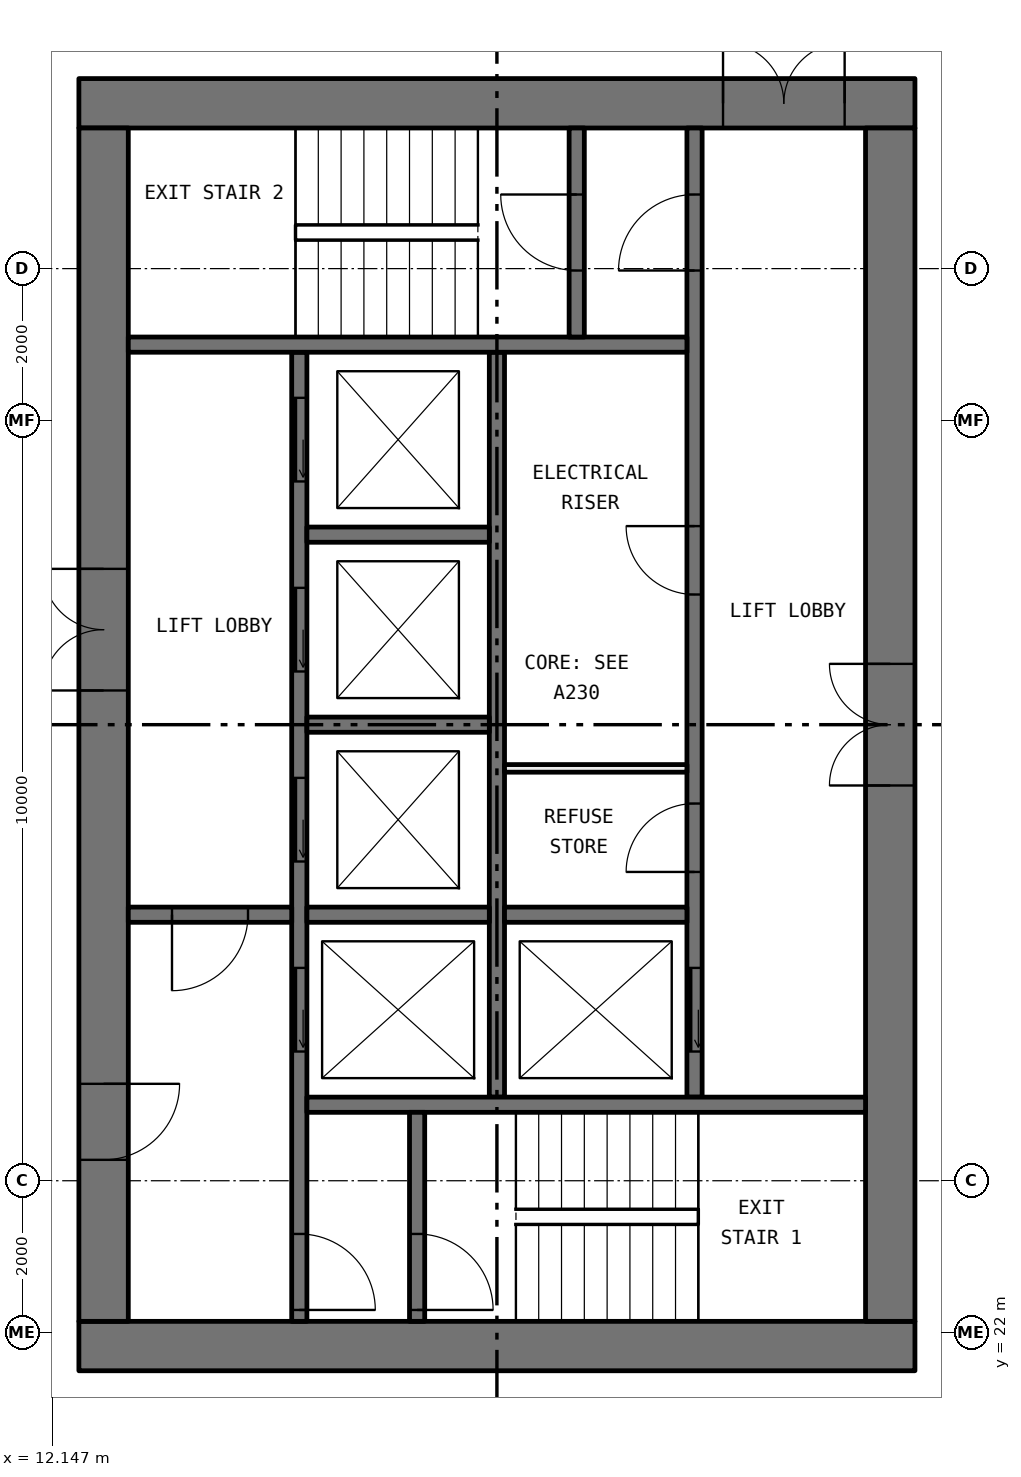
"""IFC4 building model, lengths in metres.
Left out: names, types, materials, properties, quantities, classifications, styles, units other than length and angle.
Written with IfcOpenShell. Run it as: python <this file> out.ifc"""

import sys

from ifc_helpers import new_model, si_unit, direction, frame, frame_2d, origin, place, context, subcontext, project, spatial, rectangle, extrude, element, fill, save


model = new_model("IFC4")
c1 = context("Model", 3, precision=1e-05, world=origin(), true_north=direction((0.0, 1.0)))
c2 = subcontext(c1, "Body", "Model", "MODEL_VIEW")
j1 = project(units=[si_unit("LENGTHUNIT", "METRE"), si_unit("PLANEANGLEUNIT", "RADIAN")], contexts=[c1])
p1 = place(None, origin())
s1 = spatial("IfcSite", under=j1, at=p1, CompositionType="ELEMENT")
p2 = place(p1, origin())
s2 = spatial("IfcBuilding", under=s1, at=p2, CompositionType="ELEMENT")
p3 = place(p2, frame((0.0, 0.0, 113.85)))
s3 = spatial("IfcBuildingStorey", under=s2, at=p3, CompositionType="ELEMENT", Elevation=113.85)
p4 = place(p3, frame((12.5, 21.825, 0.0), z_axis=(0.0, 0.0, 1.0), x_axis=(1.0, 0.0, 0.0)))
e1 = element("IfcWall", 1, at=p4, inside=s3, PredefinedType="SHEAR", context=c2, shape_type="SweptSolid", body=[
    extrude(rectangle(XDim=11.0, YDim=0.65, at=frame_2d((5.5, 0.0))), origin(), (0.0, 0.0, 1.0), 3.05),
])
p5 = place(p3, frame((12.5, 38.175, 0.0), z_axis=(0.0, 0.0, 1.0), x_axis=(1.0, 0.0, 0.0)))
e2 = element("IfcWall", 2, at=p5, inside=s3, PredefinedType="SHEAR", context=c2, shape_type="SweptSolid", body=[
    extrude(rectangle(XDim=11.0, YDim=0.65, at=frame_2d((5.5, 0.0))), origin(), (0.0, 0.0, 1.0), 3.05),
])
p6 = place(p5, frame((8.475, 0.0, 0.0)))
e3 = element("IfcOpeningElement", 3, at=p6, cuts=e2, PredefinedType="OPENING", context=c2, shape_type="SweptSolid", body=[
    extrude(rectangle(XDim=1.6, YDim=2.1, at=frame_2d((0.8, 1.05))), frame((0.0, 0.335, 0.0), z_axis=(0.0, -1.0, 0.0), x_axis=(1.0, 0.0, 0.0)), (0.0, 0.0, 1.0), 0.67),
])
p7 = place(p3, frame((12.825, 22.15, 0.0), z_axis=(0.0, 0.0, 1.0), x_axis=(0.0, 1.0, 0.0)))
e4 = element("IfcWall", 4, at=p7, inside=s3, PredefinedType="SHEAR", context=c2, shape_type="SweptSolid", body=[
    extrude(rectangle(XDim=15.7, YDim=0.65, at=frame_2d((7.85, 0.0))), origin(), (0.0, 0.0, 1.0), 3.05),
])
p8 = place(p7, frame((8.3, 0.0, 0.0)))
e5 = element("IfcOpeningElement", 5, at=p8, cuts=e4, PredefinedType="OPENING", context=c2, shape_type="SweptSolid", body=[
    extrude(rectangle(XDim=1.6, YDim=2.1, at=frame_2d((0.8, 1.05))), frame((0.0, 0.335, 0.0), z_axis=(0.0, -1.0, 0.0), x_axis=(1.0, 0.0, 0.0)), (0.0, 0.0, 1.0), 0.67),
])
p9 = place(p7, frame((2.125, 0.0, 0.0)))
e6 = element("IfcOpeningElement", 6, at=p9, cuts=e4, PredefinedType="OPENING", context=c2, shape_type="SweptSolid", body=[
    extrude(rectangle(XDim=1.0, YDim=2.1, at=frame_2d((0.5, 1.05))), frame((0.0, 0.335, 0.0), z_axis=(0.0, -1.0, 0.0), x_axis=(1.0, 0.0, 0.0)), (0.0, 0.0, 1.0), 0.67),
])
p10 = place(p3, frame((23.175, 22.15, 0.0), z_axis=(0.0, 0.0, 1.0), x_axis=(0.0, 1.0, 0.0)))
e7 = element("IfcWall", 7, at=p10, inside=s3, PredefinedType="SHEAR", context=c2, shape_type="SweptSolid", body=[
    extrude(rectangle(XDim=15.7, YDim=0.65, at=frame_2d((7.85, 0.0))), origin(), (0.0, 0.0, 1.0), 3.05),
])
p11 = place(p10, frame((7.05, 0.0, 0.0)))
e8 = element("IfcOpeningElement", 8, at=p11, cuts=e7, PredefinedType="OPENING", context=c2, shape_type="SweptSolid", body=[
    extrude(rectangle(XDim=1.6, YDim=2.1, at=frame_2d((0.8, 1.05))), frame((0.0, 0.335, 0.0), z_axis=(0.0, -1.0, 0.0), x_axis=(1.0, 0.0, 0.0)), (0.0, 0.0, 1.0), 0.67),
])
p12 = place(p3, frame((15.4, 22.15, 0.0), z_axis=(0.0, 0.0, 1.0), x_axis=(0.0, 1.0, 0.0)))
e9 = element("IfcWall", 9, at=p12, inside=s3, PredefinedType="SOLIDWALL", context=c2, shape_type="SweptSolid", body=[
    extrude(rectangle(XDim=12.75, YDim=0.2, at=frame_2d((6.375, 0.0))), origin(), (0.0, 0.0, 1.0), 3.05),
])
p13 = place(p12, frame((3.55, 0.0, 0.0)))
e10 = element("IfcOpeningElement", 10, at=p13, cuts=e9, PredefinedType="OPENING", context=c2, shape_type="SweptSolid", body=[
    extrude(rectangle(XDim=1.1, YDim=2.1, at=frame_2d((0.55, 1.05))), frame((0.0, 0.11, 0.0), z_axis=(0.0, -1.0, 0.0), x_axis=(1.0, 0.0, 0.0)), (0.0, 0.0, 1.0), 0.22),
])
p14 = place(p12, frame((6.05, 0.0, 0.0)))
e11 = element("IfcOpeningElement", 11, at=p14, cuts=e9, PredefinedType="OPENING", context=c2, shape_type="SweptSolid", body=[
    extrude(rectangle(XDim=1.1, YDim=2.1, at=frame_2d((0.55, 1.05))), frame((0.0, 0.11, 0.0), z_axis=(0.0, -1.0, 0.0), x_axis=(1.0, 0.0, 0.0)), (0.0, 0.0, 1.0), 0.22),
])
p15 = place(p12, frame((8.55, 0.0, 0.0)))
e12 = element("IfcOpeningElement", 12, at=p15, cuts=e9, PredefinedType="OPENING", context=c2, shape_type="SweptSolid", body=[
    extrude(rectangle(XDim=1.1, YDim=2.1, at=frame_2d((0.55, 1.05))), frame((0.0, 0.11, 0.0), z_axis=(0.0, -1.0, 0.0), x_axis=(1.0, 0.0, 0.0)), (0.0, 0.0, 1.0), 0.22),
])
p16 = place(p12, frame((11.05, 0.0, 0.0)))
e13 = element("IfcOpeningElement", 13, at=p16, cuts=e9, PredefinedType="OPENING", context=c2, shape_type="SweptSolid", body=[
    extrude(rectangle(XDim=1.1, YDim=2.1, at=frame_2d((0.55, 1.05))), frame((0.0, 0.11, 0.0), z_axis=(0.0, -1.0, 0.0), x_axis=(1.0, 0.0, 0.0)), (0.0, 0.0, 1.0), 0.22),
])
p17 = place(p12, frame((0.15, 0.0, 0.0)))
e14 = element("IfcOpeningElement", 14, at=p17, cuts=e9, PredefinedType="OPENING", context=c2, shape_type="SweptSolid", body=[
    extrude(rectangle(XDim=1.0, YDim=2.1, at=frame_2d((0.5, 1.05))), frame((0.0, 0.11, 0.0), z_axis=(0.0, -1.0, 0.0), x_axis=(1.0, 0.0, 0.0)), (0.0, 0.0, 1.0), 0.22),
])
p18 = place(p3, frame((20.6, 25.1, 0.0), z_axis=(0.0, 0.0, 1.0), x_axis=(0.0, 1.0, 0.0)))
e15 = element("IfcWall", 15, at=p18, inside=s3, PredefinedType="SOLIDWALL", context=c2, shape_type="SweptSolid", body=[
    extrude(rectangle(XDim=12.75, YDim=0.2, at=frame_2d((6.375, 0.0))), origin(), (0.0, 0.0, 1.0), 3.05),
])
p19 = place(p18, frame((0.6, 0.0, 0.0)))
e16 = element("IfcOpeningElement", 16, at=p19, cuts=e15, PredefinedType="OPENING", context=c2, shape_type="SweptSolid", body=[
    extrude(rectangle(XDim=1.1, YDim=2.1, at=frame_2d((0.55, 1.05))), frame((0.0, 0.11, 0.0), z_axis=(0.0, -1.0, 0.0), x_axis=(1.0, 0.0, 0.0)), (0.0, 0.0, 1.0), 0.22),
])
p20 = place(p18, frame((10.875, 0.0, 0.0)))
e17 = element("IfcOpeningElement", 17, at=p20, cuts=e15, PredefinedType="OPENING", context=c2, shape_type="SweptSolid", body=[
    extrude(rectangle(XDim=1.0, YDim=2.1, at=frame_2d((0.5, 1.05))), frame((0.0, 0.11, 0.0), z_axis=(0.0, -1.0, 0.0), x_axis=(1.0, 0.0, 0.0)), (0.0, 0.0, 1.0), 0.22),
])
p21 = place(p18, frame((2.962, 0.0, 0.0)))
e18 = element("IfcOpeningElement", 18, at=p21, cuts=e15, PredefinedType="OPENING", context=c2, shape_type="SweptSolid", body=[
    extrude(rectangle(XDim=0.9, YDim=2.1, at=frame_2d((0.45, 1.05))), frame((0.0, 0.11, 0.0), z_axis=(0.0, -1.0, 0.0), x_axis=(1.0, 0.0, 0.0)), (0.0, 0.0, 1.0), 0.22),
])
p22 = place(p18, frame((6.613, 0.0, 0.0)))
e19 = element("IfcOpeningElement", 19, at=p22, cuts=e15, PredefinedType="OPENING", context=c2, shape_type="SweptSolid", body=[
    extrude(rectangle(XDim=0.9, YDim=2.1, at=frame_2d((0.45, 1.05))), frame((0.0, 0.11, 0.0), z_axis=(0.0, -1.0, 0.0), x_axis=(1.0, 0.0, 0.0)), (0.0, 0.0, 1.0), 0.22),
])
p23 = place(p3, frame((18.0, 25.1, 0.0), z_axis=(0.0, 0.0, 1.0), x_axis=(0.0, 1.0, 0.0)))
e20 = element("IfcWall", 20, at=p23, inside=s3, PredefinedType="SOLIDWALL", context=c2, shape_type="SweptSolid", body=[
    extrude(rectangle(XDim=9.8, YDim=0.2, at=frame_2d((4.9, 0.0))), origin(), (0.0, 0.0, 1.0), 3.05),
])
for number, where, z_axis, x_axis in (
    (21, (15.5, 25.0, 0.0), (0.0, 0.0, 1.0), (1.0, 0.0, 0.0)),
    (22, (13.15, 35.0, 0.0), (0.0, 0.0, 1.0), (1.0, 0.0, 0.0)),
):
    element("IfcWall", number, at=place(p3, frame(where, z_axis=z_axis, x_axis=x_axis)), inside=s3, PredefinedType="SOLIDWALL", context=c2, shape_type="SweptSolid", body=[
        extrude(rectangle(XDim=7.35, YDim=0.2, at=frame_2d((3.675, 0.0))), origin(), (0.0, 0.0, 1.0), 3.05),
    ])
p24 = place(p3, frame((13.15, 27.5, 0.0), z_axis=(0.0, 0.0, 1.0), x_axis=(1.0, 0.0, 0.0)))
e23 = element("IfcWall", 23, at=p24, inside=s3, PredefinedType="SOLIDWALL", context=c2, shape_type="SweptSolid", body=[
    extrude(rectangle(XDim=2.15, YDim=0.2, at=frame_2d((1.075, 0.0))), origin(), (0.0, 0.0, 1.0), 3.05),
])
p25 = place(p24, frame((0.575, 0.0, 0.0)))
e24 = element("IfcOpeningElement", 24, at=p25, cuts=e23, PredefinedType="OPENING", context=c2, shape_type="SweptSolid", body=[
    extrude(rectangle(XDim=1.0, YDim=2.1, at=frame_2d((0.5, 1.05))), frame((0.0, 0.11, 0.0), z_axis=(0.0, -1.0, 0.0), x_axis=(1.0, 0.0, 0.0)), (0.0, 0.0, 1.0), 0.22),
])
p26 = place(p3, frame((16.95, 22.15, 0.0), z_axis=(0.0, 0.0, 1.0), x_axis=(0.0, 1.0, 0.0)))
e25 = element("IfcWall", 25, at=p26, inside=s3, PredefinedType="SOLIDWALL", context=c2, shape_type="SweptSolid", body=[
    extrude(rectangle(XDim=2.75, YDim=0.2, at=frame_2d((1.375, 0.0))), origin(), (0.0, 0.0, 1.0), 3.05),
])
p27 = place(p26, frame((0.15, 0.0, 0.0)))
e26 = element("IfcOpeningElement", 26, at=p27, cuts=e25, PredefinedType="OPENING", context=c2, shape_type="SweptSolid", body=[
    extrude(rectangle(XDim=1.0, YDim=2.1, at=frame_2d((0.5, 1.05))), frame((0.0, 0.11, 0.0), z_axis=(0.0, -1.0, 0.0), x_axis=(1.0, 0.0, 0.0)), (0.0, 0.0, 1.0), 0.22),
])
p28 = place(p3, frame((19.05, 35.1, 0.0), z_axis=(0.0, 0.0, 1.0), x_axis=(0.0, 1.0, 0.0)))
e27 = element("IfcWall", 27, at=p28, inside=s3, PredefinedType="SOLIDWALL", context=c2, shape_type="SweptSolid", body=[
    extrude(rectangle(XDim=2.75, YDim=0.2, at=frame_2d((1.375, 0.0))), origin(), (0.0, 0.0, 1.0), 3.05),
])
p29 = place(p28, frame((0.875, 0.0, 0.0)))
e28 = element("IfcOpeningElement", 28, at=p29, cuts=e27, PredefinedType="OPENING", context=c2, shape_type="SweptSolid", body=[
    extrude(rectangle(XDim=1.0, YDim=2.1, at=frame_2d((0.5, 1.05))), frame((0.0, 0.11, 0.0), z_axis=(0.0, -1.0, 0.0), x_axis=(1.0, 0.0, 0.0)), (0.0, 0.0, 1.0), 0.22),
])
for number, where, z_axis, x_axis in (
    (29, (15.5, 27.5, 0.0), (0.0, 0.0, 1.0), (1.0, 0.0, 0.0)),
    (30, (15.5, 30.0, 0.0), (0.0, 0.0, 1.0), (1.0, 0.0, 0.0)),
    (31, (15.5, 32.5, 0.0), (0.0, 0.0, 1.0), (1.0, 0.0, 0.0)),
    (32, (18.1, 27.5, 0.0), (0.0, 0.0, 1.0), (1.0, 0.0, 0.0)),
):
    element("IfcWall", number, at=place(p3, frame(where, z_axis=z_axis, x_axis=x_axis)), inside=s3, PredefinedType="SOLIDWALL", context=c2, shape_type="SweptSolid", body=[
        extrude(rectangle(XDim=2.4, YDim=0.2, at=frame_2d((1.2, 0.0))), origin(), (0.0, 0.0, 1.0), 3.05),
    ])
p30 = place(p3, frame((18.1, 29.425, 0.0), z_axis=(0.0, 0.0, 1.0), x_axis=(1.0, 0.0, 0.0)))
e33 = element("IfcWall", 33, at=p30, inside=s3, PredefinedType="PARTITIONING", context=c2, shape_type="SweptSolid", body=[
    extrude(rectangle(XDim=2.4, YDim=0.1, at=frame_2d((1.2, 0.0))), origin(), (0.0, 0.0, 1.0), 3.05),
])
p31 = place(p19, origin())
e34 = element("IfcDoor", 34, at=p31, inside=s3, OperationType="SLIDING_TO_LEFT", PredefinedType="DOOR", context=c2, shape_type="SweptSolid", body=[
    extrude(rectangle(XDim=1.1, YDim=2.1, at=frame_2d((0.55, 1.05))), frame((0.0, 0.025, 0.0), z_axis=(0.0, -1.0, 0.0), x_axis=(1.0, 0.0, 0.0)), (0.0, 0.0, 1.0), 0.05),
])
fill(e16, e34)
p32 = place(p13, origin())
e35 = element("IfcDoor", 35, at=p32, inside=s3, OperationType="SLIDING_TO_LEFT", PredefinedType="DOOR", context=c2, shape_type="SweptSolid", body=[
    extrude(rectangle(XDim=1.1, YDim=2.1, at=frame_2d((0.55, 1.05))), frame((0.0, 0.025, 0.0), z_axis=(0.0, -1.0, 0.0), x_axis=(1.0, 0.0, 0.0)), (0.0, 0.0, 1.0), 0.05),
])
fill(e10, e35)
p33 = place(p14, origin())
e36 = element("IfcDoor", 36, at=p33, inside=s3, OperationType="SLIDING_TO_LEFT", PredefinedType="DOOR", context=c2, shape_type="SweptSolid", body=[
    extrude(rectangle(XDim=1.1, YDim=2.1, at=frame_2d((0.55, 1.05))), frame((0.0, 0.025, 0.0), z_axis=(0.0, -1.0, 0.0), x_axis=(1.0, 0.0, 0.0)), (0.0, 0.0, 1.0), 0.05),
])
fill(e11, e36)
p34 = place(p15, origin())
e37 = element("IfcDoor", 37, at=p34, inside=s3, OperationType="SLIDING_TO_LEFT", PredefinedType="DOOR", context=c2, shape_type="SweptSolid", body=[
    extrude(rectangle(XDim=1.1, YDim=2.1, at=frame_2d((0.55, 1.05))), frame((0.0, 0.025, 0.0), z_axis=(0.0, -1.0, 0.0), x_axis=(1.0, 0.0, 0.0)), (0.0, 0.0, 1.0), 0.05),
])
fill(e12, e37)
p35 = place(p16, origin())
e38 = element("IfcDoor", 38, at=p35, inside=s3, OperationType="SLIDING_TO_LEFT", PredefinedType="DOOR", context=c2, shape_type="SweptSolid", body=[
    extrude(rectangle(XDim=1.1, YDim=2.1, at=frame_2d((0.55, 1.05))), frame((0.0, 0.025, 0.0), z_axis=(0.0, -1.0, 0.0), x_axis=(1.0, 0.0, 0.0)), (0.0, 0.0, 1.0), 0.05),
])
fill(e13, e38)
p36 = place(p27, frame((1.0, 0.0, 0.0), x_axis=(-1.0, 0.0, 0.0)))
e39 = element("IfcDoor", 39, at=p36, inside=s3, OperationType="SINGLE_SWING_LEFT", PredefinedType="DOOR", context=c2, shape_type="SweptSolid", body=[
    extrude(rectangle(XDim=1.0, YDim=2.1, at=frame_2d((0.5, 1.05))), frame((0.0, 0.025, 0.0), z_axis=(0.0, -1.0, 0.0), x_axis=(1.0, 0.0, 0.0)), (0.0, 0.0, 1.0), 0.05),
])
fill(e26, e39)
p37 = place(p17, frame((1.0, 0.0, 0.0), x_axis=(-1.0, 0.0, 0.0)))
e40 = element("IfcDoor", 40, at=p37, inside=s3, OperationType="SINGLE_SWING_LEFT", PredefinedType="DOOR", context=c2, shape_type="SweptSolid", body=[
    extrude(rectangle(XDim=1.0, YDim=2.1, at=frame_2d((0.5, 1.05))), frame((0.0, 0.025, 0.0), z_axis=(0.0, -1.0, 0.0), x_axis=(1.0, 0.0, 0.0)), (0.0, 0.0, 1.0), 0.05),
])
fill(e14, e40)
p38 = place(p20, origin())
e41 = element("IfcDoor", 41, at=p38, inside=s3, OperationType="SINGLE_SWING_RIGHT", PredefinedType="DOOR", context=c2, shape_type="SweptSolid", body=[
    extrude(rectangle(XDim=1.0, YDim=2.1, at=frame_2d((0.5, 1.05))), frame((0.0, 0.025, 0.0), z_axis=(0.0, -1.0, 0.0), x_axis=(1.0, 0.0, 0.0)), (0.0, 0.0, 1.0), 0.05),
])
fill(e17, e41)
p39 = place(p29, origin())
e42 = element("IfcDoor", 42, at=p39, inside=s3, OperationType="SINGLE_SWING_LEFT", PredefinedType="DOOR", context=c2, shape_type="SweptSolid", body=[
    extrude(rectangle(XDim=1.0, YDim=2.1, at=frame_2d((0.5, 1.05))), frame((0.0, 0.025, 0.0), z_axis=(0.0, -1.0, 0.0), x_axis=(1.0, 0.0, 0.0)), (0.0, 0.0, 1.0), 0.05),
])
fill(e28, e42)
p40 = place(p25, frame((1.0, 0.0, 0.0), x_axis=(-1.0, 0.0, 0.0)))
e43 = element("IfcDoor", 43, at=p40, inside=s3, OperationType="SINGLE_SWING_LEFT", PredefinedType="DOOR", context=c2, shape_type="SweptSolid", body=[
    extrude(rectangle(XDim=1.0, YDim=2.1, at=frame_2d((0.5, 1.05))), frame((0.0, 0.025, 0.0), z_axis=(0.0, -1.0, 0.0), x_axis=(1.0, 0.0, 0.0)), (0.0, 0.0, 1.0), 0.05),
])
fill(e24, e43)
p41 = place(p8, origin())
e44 = element("IfcDoor", 44, at=p41, inside=s3, OperationType="DOUBLE_DOOR_SINGLE_SWING", PredefinedType="DOOR", context=c2, shape_type="SweptSolid", body=[
    extrude(rectangle(XDim=1.6, YDim=2.1, at=frame_2d((0.8, 1.05))), frame((0.0, 0.025, 0.0), z_axis=(0.0, -1.0, 0.0), x_axis=(1.0, 0.0, 0.0)), (0.0, 0.0, 1.0), 0.05),
])
fill(e5, e44)
p42 = place(p9, frame((1.0, 0.0, 0.0), x_axis=(-1.0, 0.0, 0.0)))
e45 = element("IfcDoor", 45, at=p42, inside=s3, OperationType="SINGLE_SWING_RIGHT", PredefinedType="DOOR", context=c2, shape_type="SweptSolid", body=[
    extrude(rectangle(XDim=1.0, YDim=2.1, at=frame_2d((0.5, 1.05))), frame((0.0, 0.025, 0.0), z_axis=(0.0, -1.0, 0.0), x_axis=(1.0, 0.0, 0.0)), (0.0, 0.0, 1.0), 0.05),
])
fill(e6, e45)
p43 = place(p6, origin())
e46 = element("IfcDoor", 46, at=p43, inside=s3, OperationType="DOUBLE_DOOR_SINGLE_SWING", PredefinedType="DOOR", context=c2, shape_type="SweptSolid", body=[
    extrude(rectangle(XDim=1.6, YDim=2.1, at=frame_2d((0.8, 1.05))), frame((0.0, 0.025, 0.0), z_axis=(0.0, -1.0, 0.0), x_axis=(1.0, 0.0, 0.0)), (0.0, 0.0, 1.0), 0.05),
])
fill(e3, e46)
p44 = place(p11, origin())
e47 = element("IfcDoor", 47, at=p44, inside=s3, OperationType="DOUBLE_DOOR_SINGLE_SWING", PredefinedType="DOOR", context=c2, shape_type="SweptSolid", body=[
    extrude(rectangle(XDim=1.6, YDim=2.1, at=frame_2d((0.8, 1.05))), frame((0.0, 0.025, 0.0), z_axis=(0.0, -1.0, 0.0), x_axis=(1.0, 0.0, 0.0)), (0.0, 0.0, 1.0), 0.05),
])
fill(e8, e47)
p45 = place(p21, origin())
e48 = element("IfcDoor", 48, at=p45, inside=s3, OperationType="SINGLE_SWING_RIGHT", PredefinedType="DOOR", context=c2, shape_type="SweptSolid", body=[
    extrude(rectangle(XDim=0.9, YDim=2.1, at=frame_2d((0.45, 1.05))), frame((0.0, 0.025, 0.0), z_axis=(0.0, -1.0, 0.0), x_axis=(1.0, 0.0, 0.0)), (0.0, 0.0, 1.0), 0.05),
])
fill(e18, e48)
p46 = place(p22, origin())
e49 = element("IfcDoor", 49, at=p46, inside=s3, OperationType="SINGLE_SWING_LEFT", PredefinedType="DOOR", context=c2, shape_type="SweptSolid", body=[
    extrude(rectangle(XDim=0.9, YDim=2.1, at=frame_2d((0.45, 1.05))), frame((0.0, 0.025, 0.0), z_axis=(0.0, -1.0, 0.0), x_axis=(1.0, 0.0, 0.0)), (0.0, 0.0, 1.0), 0.05),
])
fill(e19, e49)
save(model, sys.argv[1])
